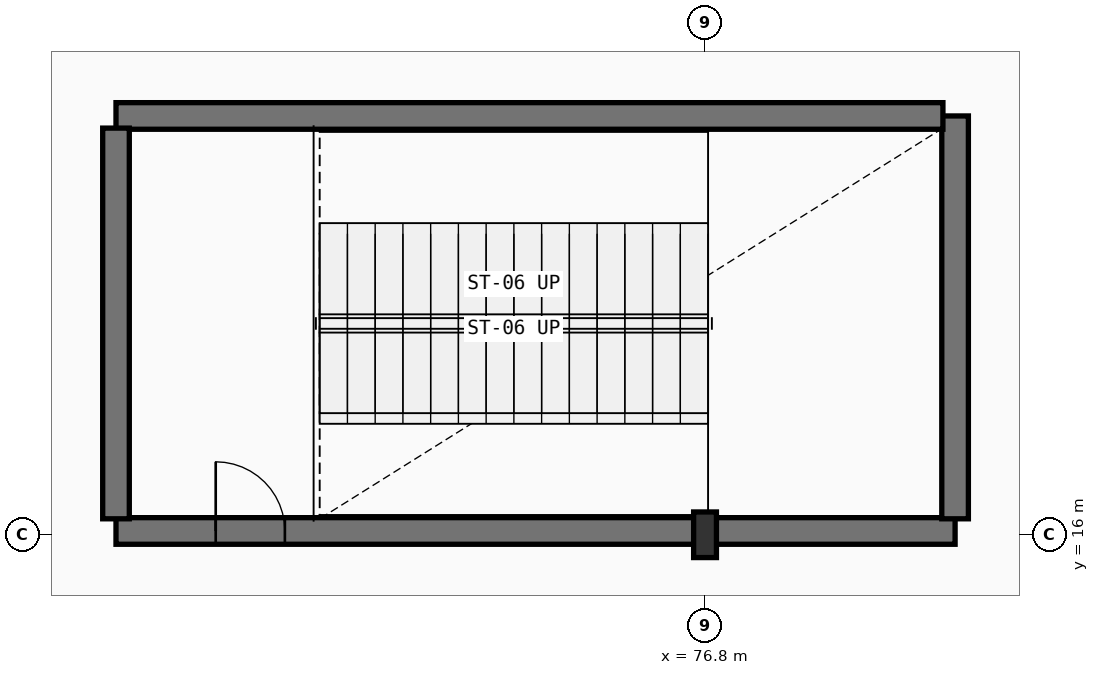
"""IFC4 building model, lengths in metres.
Left out: names, types, materials, properties, quantities, classifications, styles, units other than length and angle.
Written with IfcOpenShell. Run it as: python <this file> out.ifc"""

import sys

from ifc_helpers import new_model, si_unit, direction, frame, frame_2d, origin, origin_2d, place, context, subcontext, project, spatial, rectangle, i_section, extrude, element, fill, save


model = new_model("IFC4")
c1 = context("Model", 3, precision=1e-05, world=origin(), true_north=direction((0.0, 1.0)))
c2 = subcontext(c1, "Body", "Model", "MODEL_VIEW")
j1 = project(units=[si_unit("LENGTHUNIT", "METRE"), si_unit("PLANEANGLEUNIT", "RADIAN")], contexts=[c1])
p1 = place(None, origin())
s1 = spatial("IfcSite", under=j1, at=p1, CompositionType="ELEMENT")
p2 = place(p1, origin())
s2 = spatial("IfcBuilding", under=s1, at=p2, CompositionType="ELEMENT")
p3 = place(p2, frame((0.0, 0.0, 6.0)))
s3 = spatial("IfcBuildingStorey", under=s2, at=p3, CompositionType="ELEMENT", Elevation=6.0)
p4 = place(p3, frame((76.8, 16.0, 0.0), z_axis=(0.0, 0.0, 1.0), x_axis=(1.0, 0.0, 0.0)))
e1 = element("IfcColumn", 1, at=p4, inside=s3, PredefinedType="COLUMN", context=c2, shape_type="SweptSolid", body=[
    extrude(i_section(OverallWidth=0.3, OverallDepth=0.6, WebThickness=0.015, FlangeThickness=0.03, FilletRadius=0.027, at=origin_2d()), origin(), (0.0, 0.0, 1.0), 5.4),
])
p5 = place(p3, frame((69.05, 16.05, 0.0), z_axis=(0.0, 0.0, 1.0), x_axis=(1.0, 0.0, 0.0)))
e2 = element("IfcWall", 2, at=p5, inside=s3, PredefinedType="SHEAR", context=c2, shape_type="SweptSolid", body=[
    extrude(rectangle(XDim=11.04, YDim=0.35, at=frame_2d((5.52, 0.0))), origin(), (0.0, 0.0, 1.0), 5.15),
])
p6 = place(p5, frame((1.312, 0.0, 0.0)))
e3 = element("IfcOpeningElement", 3, at=p6, cuts=e2, PredefinedType="OPENING", context=c2, shape_type="SweptSolid", body=[
    extrude(rectangle(XDim=0.91, YDim=2.08, at=frame_2d((0.455, 1.04))), frame((0.0, 0.185, 0.0), z_axis=(0.0, -1.0, 0.0), x_axis=(1.0, 0.0, 0.0)), (0.0, 0.0, 1.0), 0.37),
])
p7 = place(p3, frame((80.09, 16.21, 0.0), z_axis=(0.0, 0.0, 1.0), x_axis=(0.0, 1.0, 0.0)))
e4 = element("IfcWall", 4, at=p7, inside=s3, PredefinedType="SHEAR", context=c2, shape_type="SweptSolid", body=[
    extrude(rectangle(XDim=5.3, YDim=0.35, at=frame_2d((2.65, 0.0))), origin(), (0.0, 0.0, 1.0), 5.15),
])
p8 = place(p3, frame((79.93, 21.51, 0.0), z_axis=(0.0, 0.0, 1.0), x_axis=(-1.0, 0.0, 0.0)))
e5 = element("IfcWall", 5, at=p8, inside=s3, PredefinedType="SHEAR", context=c2, shape_type="SweptSolid", body=[
    extrude(rectangle(XDim=10.88, YDim=0.35, at=frame_2d((5.44, 0.0))), origin(), (0.0, 0.0, 1.0), 5.15),
])
p9 = place(p3, frame((69.05, 21.35, 0.0), z_axis=(0.0, 0.0, 1.0), x_axis=(0.0, -1.0, 0.0)))
e6 = element("IfcWall", 6, at=p9, inside=s3, PredefinedType="SHEAR", context=c2, shape_type="SweptSolid", body=[
    extrude(rectangle(XDim=5.14, YDim=0.35, at=frame_2d((2.57, 0.0))), origin(), (0.0, 0.0, 1.0), 5.15),
])
p10 = place(p6, origin())
e7 = element("IfcDoor", 7, at=p10, inside=s3, OperationType="SINGLE_SWING_RIGHT", PredefinedType="DOOR", context=c2, shape_type="SweptSolid", body=[
    extrude(rectangle(XDim=0.91, YDim=2.08, at=frame_2d((0.455, 1.04))), frame((0.0, 0.025, 0.0), z_axis=(0.0, -1.0, 0.0), x_axis=(1.0, 0.0, 0.0)), (0.0, 0.0, 1.0), 0.05),
])
fill(e3, e7)
save(model, sys.argv[1])
